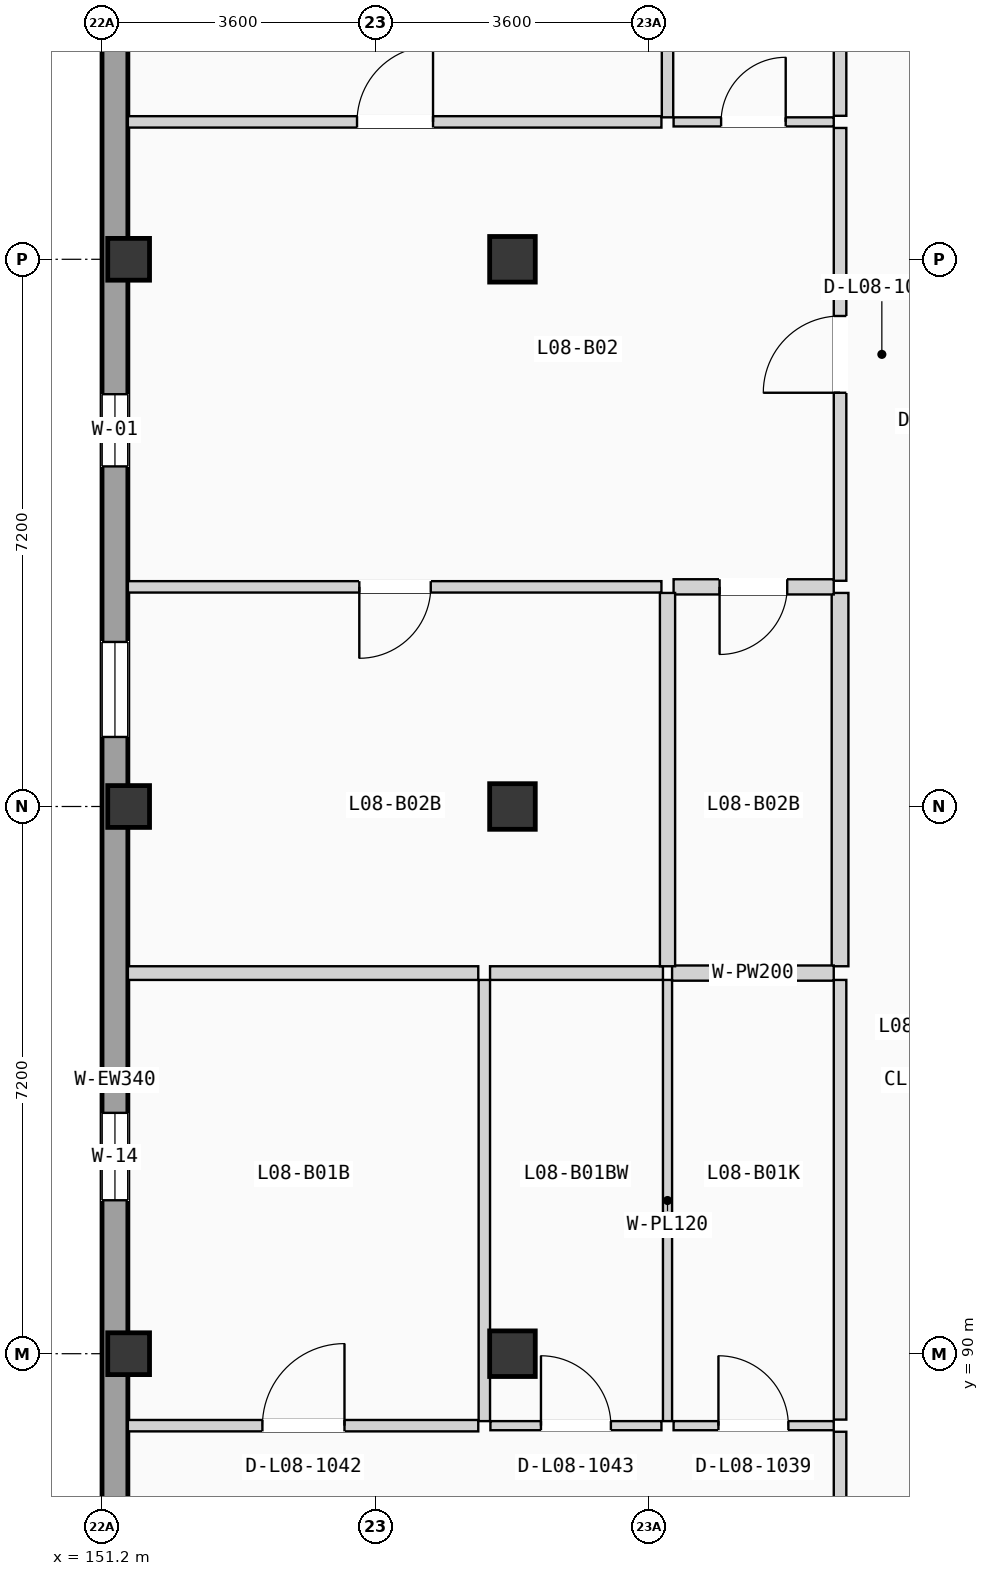
"""IFC4 building model, lengths in metres.
Left out: names, types, materials, properties, quantities, classifications, styles, units other than length and angle.
Written with IfcOpenShell. Run it as: python <this file> out.ifc"""

import sys

from ifc_helpers import new_model, si_unit, direction, frame, frame_2d, origin, origin_2d, place, context, subcontext, project, spatial, rectangle, extrude, element, fill, save


model = new_model("IFC4")
c1 = context("Model", 3, precision=1e-05, world=origin(), true_north=direction((0.0, 1.0)))
c2 = subcontext(c1, "Body", "Model", "MODEL_VIEW")
j1 = project(units=[si_unit("LENGTHUNIT", "METRE"), si_unit("PLANEANGLEUNIT", "RADIAN")], contexts=[c1])
p1 = place(None, origin())
s1 = spatial("IfcSite", under=j1, at=p1, CompositionType="ELEMENT")
p2 = place(p1, origin())
s2 = spatial("IfcBuilding", under=s1, at=p2, CompositionType="ELEMENT")
p3 = place(p2, frame((0.0, 0.0, 27.825)))
s3 = spatial("IfcBuildingStorey", under=s2, at=p3, CompositionType="ELEMENT", Elevation=27.825)
for number, where, z_axis, x_axis in (
    (1, (151.55, 90.0, 0.0), (0.0, 0.0, 1.0), (1.0, 0.0, 0.0)),
    (2, (151.55, 97.2, 0.0), (0.0, 0.0, 1.0), (1.0, 0.0, 0.0)),
    (3, (151.55, 104.4, 0.0), (0.0, 0.0, 1.0), (1.0, 0.0, 0.0)),
):
    element("IfcColumn", number, at=place(p3, frame(where, z_axis=z_axis, x_axis=x_axis)), inside=s3, PredefinedType="COLUMN", context=c2, shape_type="SweptSolid", body=[
        extrude(rectangle(XDim=0.55, YDim=0.55, at=origin_2d()), origin(), (0.0, 0.0, 1.0), 3.15),
    ])
for number, where, z_axis, x_axis in (
    (4, (156.6, 90.0, 0.0), (0.0, 0.0, 1.0), (1.0, 0.0, 0.0)),
    (5, (156.6, 97.2, 0.0), (0.0, 0.0, 1.0), (1.0, 0.0, 0.0)),
    (6, (156.6, 104.4, 0.0), (0.0, 0.0, 1.0), (1.0, 0.0, 0.0)),
):
    element("IfcColumn", number, at=place(p3, frame(where, z_axis=z_axis, x_axis=x_axis)), inside=s3, PredefinedType="COLUMN", context=c2, shape_type="SweptSolid", body=[
        extrude(rectangle(XDim=0.6, YDim=0.6, at=origin_2d()), origin(), (0.0, 0.0, 1.0), 3.15),
    ])
p4 = place(p3, frame((151.37, 68.74, 0.0), z_axis=(0.0, 0.0, 1.0), x_axis=(0.0, 1.0, 0.0)))
e7 = element("IfcWall", 7, at=p4, inside=s3, PredefinedType="SOLIDWALL", context=c2, shape_type="SweptSolid", body=[
    extrude(rectangle(XDim=49.72, YDim=0.34, at=frame_2d((24.86, 0.0))), origin(), (0.0, 0.0, 1.0), 2.89),
])
p5 = place(p4, frame((16.707, 0.0, 0.855)))
e8 = element("IfcOpeningElement", 8, at=p5, cuts=e7, PredefinedType="OPENING", context=c2, shape_type="SweptSolid", body=[
    extrude(rectangle(XDim=1.15, YDim=1.35, at=frame_2d((0.575, 0.675))), frame((0.0, 0.18, 0.0), z_axis=(0.0, -1.0, 0.0), x_axis=(1.0, 0.0, 0.0)), (0.0, 0.0, 1.0), 0.36),
])
p6 = place(p4, frame((9.578, 0.0, 0.705)))
e9 = element("IfcOpeningElement", 9, at=p6, cuts=e7, PredefinedType="OPENING", context=c2, shape_type="SweptSolid", body=[
    extrude(rectangle(XDim=1.15, YDim=1.5, at=frame_2d((0.575, 0.75))), frame((0.0, 0.18, 0.0), z_axis=(0.0, -1.0, 0.0), x_axis=(1.0, 0.0, 0.0)), (0.0, 0.0, 1.0), 0.36),
])
p7 = place(p4, frame((23.279, 0.0, 0.555)))
e10 = element("IfcOpeningElement", 10, at=p7, cuts=e7, PredefinedType="OPENING", context=c2, shape_type="SweptSolid", body=[
    extrude(rectangle(XDim=1.15, YDim=1.65, at=frame_2d((0.575, 0.825))), frame((0.0, 0.18, 0.0), z_axis=(0.0, -1.0, 0.0), x_axis=(1.0, 0.0, 0.0)), (0.0, 0.0, 1.0), 0.36),
])
p8 = place(p4, frame((32.935, 0.0, 0.85)))
e11 = element("IfcOpeningElement", 11, at=p8, cuts=e7, PredefinedType="OPENING", context=c2, shape_type="SweptSolid", body=[
    extrude(rectangle(XDim=0.95, YDim=1.2, at=frame_2d((0.475, 0.6))), frame((0.0, 0.18, 0.0), z_axis=(0.0, -1.0, 0.0), x_axis=(1.0, 0.0, 0.0)), (0.0, 0.0, 1.0), 0.36),
])
p9 = place(p4, frame((29.375, 0.0, 0.9)))
e12 = element("IfcOpeningElement", 12, at=p9, cuts=e7, PredefinedType="OPENING", context=c2, shape_type="SweptSolid", body=[
    extrude(rectangle(XDim=1.25, YDim=1.2, at=frame_2d((0.625, 0.6))), frame((0.0, 0.18, 0.0), z_axis=(0.0, -1.0, 0.0), x_axis=(1.0, 0.0, 0.0)), (0.0, 0.0, 1.0), 0.36),
])
p10 = place(p4, frame((39.379, 0.0, 0.855)))
e13 = element("IfcOpeningElement", 13, at=p10, cuts=e7, PredefinedType="OPENING", context=c2, shape_type="SweptSolid", body=[
    extrude(rectangle(XDim=1.25, YDim=1.35, at=frame_2d((0.625, 0.675))), frame((0.0, 0.18, 0.0), z_axis=(0.0, -1.0, 0.0), x_axis=(1.0, 0.0, 0.0)), (0.0, 0.0, 1.0), 0.36),
])
p11 = place(p3, frame((160.91, 81.945, 0.0), z_axis=(0.0, 0.0, 1.0), x_axis=(0.0, 1.0, 0.0)))
e14 = element("IfcWall", 14, at=p11, inside=s3, PredefinedType="PARTITIONING", context=c2, shape_type="SweptSolid", body=[
    extrude(rectangle(XDim=7.028, YDim=0.165, at=frame_2d((3.514, 0.0))), origin(), (0.0, 0.0, 1.0), 2.87),
])
p12 = place(p11, frame((3.009, 0.0, 0.0)))
e15 = element("IfcOpeningElement", 15, at=p12, cuts=e14, PredefinedType="OPENING", context=c2, shape_type="SweptSolid", body=[
    extrude(rectangle(XDim=1.01, YDim=2.11, at=frame_2d((0.505, 1.055))), frame((0.0, 0.093, 0.0), z_axis=(0.0, -1.0, 0.0), x_axis=(1.0, 0.0, 0.0)), (0.0, 0.0, 1.0), 0.185),
])
p13 = place(p3, frame((160.91, 89.133, 0.0), z_axis=(0.0, 0.0, 1.0), x_axis=(0.0, 1.0, 0.0)))
e16 = element("IfcWall", 16, at=p13, inside=s3, PredefinedType="PARTITIONING", context=c2, shape_type="SweptSolid", body=[
    extrude(rectangle(XDim=5.785, YDim=0.165, at=frame_2d((2.893, 0.0))), origin(), (0.0, 0.0, 1.0), 2.87),
])
p14 = place(p3, frame((160.91, 100.17, 0.0), z_axis=(0.0, 0.0, 1.0), x_axis=(0.0, 1.0, 0.0)))
e17 = element("IfcWall", 17, at=p14, inside=s3, PredefinedType="PARTITIONING", context=c2, shape_type="SweptSolid", body=[
    extrude(rectangle(XDim=5.958, YDim=0.165, at=frame_2d((2.979, 0.0))), origin(), (0.0, 0.0, 1.0), 2.87),
])
p15 = place(p14, frame((2.474, 0.0, 0.0)))
e18 = element("IfcOpeningElement", 18, at=p15, cuts=e17, PredefinedType="OPENING", context=c2, shape_type="SweptSolid", body=[
    extrude(rectangle(XDim=1.01, YDim=2.11, at=frame_2d((0.505, 1.055))), frame((0.0, 0.093, 0.0), z_axis=(0.0, -1.0, 0.0), x_axis=(1.0, 0.0, 0.0)), (0.0, 0.0, 1.0), 0.185),
])
p16 = place(p3, frame((160.91, 95.098, 0.0), z_axis=(0.0, 0.0, 1.0), x_axis=(0.0, 1.0, 0.0)))
e19 = element("IfcWall", 19, at=p16, inside=s3, PredefinedType="PLUMBINGWALL", context=c2, shape_type="SweptSolid", body=[
    extrude(rectangle(XDim=4.912, YDim=0.22, at=frame_2d((2.456, 0.0))), origin(), (0.0, 0.0, 1.0), 2.87),
])
p17 = place(p3, frame((160.91, 106.288, 0.0), z_axis=(0.0, 0.0, 1.0), x_axis=(0.0, 1.0, 0.0)))
e20 = element("IfcWall", 20, at=p17, inside=s3, PredefinedType="PARTITIONING", context=c2, shape_type="SweptSolid", body=[
    extrude(rectangle(XDim=4.912, YDim=0.165, at=frame_2d((2.456, 0.0))), origin(), (0.0, 0.0, 1.0), 2.87),
])
p18 = place(p3, frame((158.72, 89.053, 0.0), z_axis=(0.0, 0.0, 1.0), x_axis=(1.0, 0.0, 0.0)))
e21 = element("IfcWall", 21, at=p18, inside=s3, PredefinedType="PARTITIONING", context=c2, shape_type="SweptSolid", body=[
    extrude(rectangle(XDim=2.107, YDim=0.12, at=frame_2d((1.053, 0.0))), origin(), (0.0, 0.0, 1.0), 2.87),
])
p19 = place(p18, frame((0.59, 0.0, 0.0)))
e22 = element("IfcOpeningElement", 22, at=p19, cuts=e21, PredefinedType="OPENING", context=c2, shape_type="SweptSolid", body=[
    extrude(rectangle(XDim=0.92, YDim=2.02, at=frame_2d((0.46, 1.01))), frame((0.0, 0.07, 0.0), z_axis=(0.0, -1.0, 0.0), x_axis=(1.0, 0.0, 0.0)), (0.0, 0.0, 1.0), 0.14),
])
p20 = place(p3, frame((151.54, 89.053, 0.0), z_axis=(0.0, 0.0, 1.0), x_axis=(1.0, 0.0, 0.0)))
e23 = element("IfcWall", 23, at=p20, inside=s3, PredefinedType="PARTITIONING", context=c2, shape_type="SweptSolid", body=[
    extrude(rectangle(XDim=4.61, YDim=0.15, at=frame_2d((2.305, 0.0))), origin(), (0.0, 0.0, 1.0), 2.87),
])
p21 = place(p20, frame((1.77, 0.0, 0.0)))
e24 = element("IfcOpeningElement", 24, at=p21, cuts=e23, PredefinedType="OPENING", context=c2, shape_type="SweptSolid", body=[
    extrude(rectangle(XDim=1.08, YDim=2.1, at=frame_2d((0.54, 1.05))), frame((0.0, 0.085, 0.0), z_axis=(0.0, -1.0, 0.0), x_axis=(1.0, 0.0, 0.0)), (0.0, 0.0, 1.0), 0.17),
])
p22 = place(p3, frame((156.31, 89.053, 0.0), z_axis=(0.0, 0.0, 1.0), x_axis=(1.0, 0.0, 0.0)))
e25 = element("IfcWall", 25, at=p22, inside=s3, PredefinedType="PARTITIONING", context=c2, shape_type="SweptSolid", body=[
    extrude(rectangle(XDim=2.25, YDim=0.12, at=frame_2d((1.125, 0.0))), origin(), (0.0, 0.0, 1.0), 2.87),
])
p23 = place(p22, frame((0.665, 0.0, 0.0)))
e26 = element("IfcOpeningElement", 26, at=p23, cuts=e25, PredefinedType="OPENING", context=c2, shape_type="SweptSolid", body=[
    extrude(rectangle(XDim=0.92, YDim=2.02, at=frame_2d((0.46, 1.01))), frame((0.0, 0.07, 0.0), z_axis=(0.0, -1.0, 0.0), x_axis=(1.0, 0.0, 0.0)), (0.0, 0.0, 1.0), 0.14),
])
p24 = place(p3, frame((158.64, 89.113, 0.0), z_axis=(0.0, 0.0, 1.0), x_axis=(0.0, 1.0, 0.0)))
e27 = element("IfcWall", 27, at=p24, inside=s3, PredefinedType="PARTITIONING", context=c2, shape_type="SweptSolid", body=[
    extrude(rectangle(XDim=5.805, YDim=0.12, at=frame_2d((2.902, 0.0))), origin(), (0.0, 0.0, 1.0), 2.87),
])
p25 = place(p3, frame((158.7, 95.008, 0.0), z_axis=(0.0, 0.0, 1.0), x_axis=(1.0, 0.0, 0.0)))
e28 = element("IfcWall", 28, at=p25, inside=s3, PredefinedType="PLUMBINGWALL", context=c2, shape_type="SweptSolid", body=[
    extrude(rectangle(XDim=2.127, YDim=0.2, at=frame_2d((1.063, 0.0))), origin(), (0.0, 0.0, 1.0), 2.87),
])
p26 = place(p3, frame((156.23, 89.113, 0.0), z_axis=(0.0, 0.0, 1.0), x_axis=(0.0, 1.0, 0.0)))
e29 = element("IfcWall", 29, at=p26, inside=s3, PredefinedType="PARTITIONING", context=c2, shape_type="SweptSolid", body=[
    extrude(rectangle(XDim=5.805, YDim=0.15, at=frame_2d((2.902, 0.0))), origin(), (0.0, 0.0, 1.0), 2.87),
])
p27 = place(p3, frame((151.54, 95.008, 0.0), z_axis=(0.0, 0.0, 1.0), x_axis=(1.0, 0.0, 0.0)))
e30 = element("IfcWall", 30, at=p27, inside=s3, PredefinedType="PARTITIONING", context=c2, shape_type="SweptSolid", body=[
    extrude(rectangle(XDim=4.61, YDim=0.18, at=frame_2d((2.305, 0.0))), origin(), (0.0, 0.0, 1.0), 2.87),
])
p28 = place(p3, frame((156.305, 95.008, 0.0), z_axis=(0.0, 0.0, 1.0), x_axis=(1.0, 0.0, 0.0)))
e31 = element("IfcWall", 31, at=p28, inside=s3, PredefinedType="PARTITIONING", context=c2, shape_type="SweptSolid", body=[
    extrude(rectangle(XDim=2.275, YDim=0.18, at=frame_2d((1.138, 0.0))), origin(), (0.0, 0.0, 1.0), 2.87),
])
p29 = place(p3, frame((158.72, 100.09, 0.0), z_axis=(0.0, 0.0, 1.0), x_axis=(1.0, 0.0, 0.0)))
e32 = element("IfcWall", 32, at=p29, inside=s3, PredefinedType="PLUMBINGWALL", context=c2, shape_type="SweptSolid", body=[
    extrude(rectangle(XDim=2.107, YDim=0.2, at=frame_2d((1.053, 0.0))), origin(), (0.0, 0.0, 1.0), 2.87),
])
p30 = place(p29, frame((0.605, 0.0, 0.0)))
e33 = element("IfcOpeningElement", 33, at=p30, cuts=e32, PredefinedType="OPENING", context=c2, shape_type="SweptSolid", body=[
    extrude(rectangle(XDim=0.89, YDim=2.03, at=frame_2d((0.445, 1.015))), frame((0.0, 0.11, 0.0), z_axis=(0.0, -1.0, 0.0), x_axis=(1.0, 0.0, 0.0)), (0.0, 0.0, 1.0), 0.22),
])
p31 = place(p3, frame((158.72, 106.208, 0.0), z_axis=(0.0, 0.0, 1.0), x_axis=(1.0, 0.0, 0.0)))
e34 = element("IfcWall", 34, at=p31, inside=s3, PredefinedType="PARTITIONING", context=c2, shape_type="SweptSolid", body=[
    extrude(rectangle(XDim=2.107, YDim=0.12, at=frame_2d((1.053, 0.0))), origin(), (0.0, 0.0, 1.0), 2.87),
])
p32 = place(p31, frame((0.625, 0.0, 0.0)))
e35 = element("IfcOpeningElement", 35, at=p32, cuts=e34, PredefinedType="OPENING", context=c2, shape_type="SweptSolid", body=[
    extrude(rectangle(XDim=0.85, YDim=2.01, at=frame_2d((0.425, 1.005))), frame((0.0, 0.07, 0.0), z_axis=(0.0, -1.0, 0.0), x_axis=(1.0, 0.0, 0.0)), (0.0, 0.0, 1.0), 0.14),
])
p33 = place(p3, frame((151.54, 100.09, 0.0), z_axis=(0.0, 0.0, 1.0), x_axis=(1.0, 0.0, 0.0)))
e36 = element("IfcWall", 36, at=p33, inside=s3, PredefinedType="PARTITIONING", context=c2, shape_type="SweptSolid", body=[
    extrude(rectangle(XDim=7.02, YDim=0.15, at=frame_2d((3.51, 0.0))), origin(), (0.0, 0.0, 1.0), 2.87),
])
p34 = place(p33, frame((3.045, 0.0, 0.0)))
e37 = element("IfcOpeningElement", 37, at=p34, cuts=e36, PredefinedType="OPENING", context=c2, shape_type="SweptSolid", body=[
    extrude(rectangle(XDim=0.94, YDim=2.06, at=frame_2d((0.47, 1.03))), frame((0.0, 0.085, 0.0), z_axis=(0.0, -1.0, 0.0), x_axis=(1.0, 0.0, 0.0)), (0.0, 0.0, 1.0), 0.17),
])
p35 = place(p3, frame((151.54, 106.208, 0.0), z_axis=(0.0, 0.0, 1.0), x_axis=(1.0, 0.0, 0.0)))
e38 = element("IfcWall", 38, at=p35, inside=s3, PredefinedType="PARTITIONING", context=c2, shape_type="SweptSolid", body=[
    extrude(rectangle(XDim=7.02, YDim=0.15, at=frame_2d((3.51, 0.0))), origin(), (0.0, 0.0, 1.0), 2.87),
])
p36 = place(p35, frame((3.015, 0.0, 0.0)))
e39 = element("IfcOpeningElement", 39, at=p36, cuts=e38, PredefinedType="OPENING", context=c2, shape_type="SweptSolid", body=[
    extrude(rectangle(XDim=1.0, YDim=2.06, at=frame_2d((0.5, 1.03))), frame((0.0, 0.085, 0.0), z_axis=(0.0, -1.0, 0.0), x_axis=(1.0, 0.0, 0.0)), (0.0, 0.0, 1.0), 0.17),
])
p37 = place(p3, frame((158.64, 95.098, 0.0), z_axis=(0.0, 0.0, 1.0), x_axis=(0.0, 1.0, 0.0)))
e40 = element("IfcWall", 40, at=p37, inside=s3, PredefinedType="PLUMBINGWALL", context=c2, shape_type="SweptSolid", body=[
    extrude(rectangle(XDim=4.912, YDim=0.2, at=frame_2d((2.456, 0.0))), origin(), (0.0, 0.0, 1.0), 2.87),
])
p38 = place(p3, frame((158.64, 106.268, 0.0), z_axis=(0.0, 0.0, 1.0), x_axis=(0.0, 1.0, 0.0)))
e41 = element("IfcWall", 41, at=p38, inside=s3, PredefinedType="PARTITIONING", context=c2, shape_type="SweptSolid", body=[
    extrude(rectangle(XDim=4.932, YDim=0.15, at=frame_2d((2.466, 0.0))), origin(), (0.0, 0.0, 1.0), 2.87),
])
p39 = place(p7, origin())
e42 = element("IfcWindow", 42, at=p39, inside=s3, PartitioningType="SINGLE_PANEL", PredefinedType="WINDOW", context=c2, shape_type="SweptSolid", body=[
    extrude(rectangle(XDim=1.15, YDim=1.65, at=frame_2d((0.575, 0.825))), frame((0.0, 0.03, 0.0), z_axis=(0.0, -1.0, 0.0), x_axis=(1.0, 0.0, 0.0)), (0.0, 0.0, 1.0), 0.06),
])
fill(e10, e42)
p40 = place(p8, origin())
e43 = element("IfcWindow", 43, at=p40, inside=s3, PartitioningType="SINGLE_PANEL", PredefinedType="WINDOW", context=c2, shape_type="SweptSolid", body=[
    extrude(rectangle(XDim=0.95, YDim=1.2, at=frame_2d((0.475, 0.6))), frame((0.0, 0.03, 0.0), z_axis=(0.0, -1.0, 0.0), x_axis=(1.0, 0.0, 0.0)), (0.0, 0.0, 1.0), 0.06),
])
fill(e11, e43)
p41 = place(p9, origin())
e44 = element("IfcWindow", 44, at=p41, inside=s3, PartitioningType="SINGLE_PANEL", PredefinedType="WINDOW", context=c2, shape_type="SweptSolid", body=[
    extrude(rectangle(XDim=1.25, YDim=1.2, at=frame_2d((0.625, 0.6))), frame((0.0, 0.03, 0.0), z_axis=(0.0, -1.0, 0.0), x_axis=(1.0, 0.0, 0.0)), (0.0, 0.0, 1.0), 0.06),
])
fill(e12, e44)
p42 = place(p15, origin())
e45 = element("IfcDoor", 45, at=p42, inside=s3, OperationType="SINGLE_SWING_LEFT", PredefinedType="DOOR", context=c2, shape_type="SweptSolid", body=[
    extrude(rectangle(XDim=1.01, YDim=2.11, at=frame_2d((0.505, 1.055))), frame((0.0, 0.025, 0.0), z_axis=(0.0, -1.0, 0.0), x_axis=(1.0, 0.0, 0.0)), (0.0, 0.0, 1.0), 0.05),
])
fill(e18, e45)
p43 = place(p19, origin())
e46 = element("IfcDoor", 46, at=p43, inside=s3, OperationType="SINGLE_SWING_LEFT", PredefinedType="DOOR", context=c2, shape_type="SweptSolid", body=[
    extrude(rectangle(XDim=0.92, YDim=2.02, at=frame_2d((0.46, 1.01))), frame((0.0, 0.025, 0.0), z_axis=(0.0, -1.0, 0.0), x_axis=(1.0, 0.0, 0.0)), (0.0, 0.0, 1.0), 0.05),
])
fill(e22, e46)
p44 = place(p21, origin())
e47 = element("IfcDoor", 47, at=p44, inside=s3, OperationType="SINGLE_SWING_RIGHT", PredefinedType="DOOR", context=c2, shape_type="SweptSolid", body=[
    extrude(rectangle(XDim=1.08, YDim=2.1, at=frame_2d((0.54, 1.05))), frame((0.0, 0.025, 0.0), z_axis=(0.0, -1.0, 0.0), x_axis=(1.0, 0.0, 0.0)), (0.0, 0.0, 1.0), 0.05),
])
fill(e24, e47)
p45 = place(p23, origin())
e48 = element("IfcDoor", 48, at=p45, inside=s3, OperationType="SINGLE_SWING_LEFT", PredefinedType="DOOR", context=c2, shape_type="SweptSolid", body=[
    extrude(rectangle(XDim=0.92, YDim=2.02, at=frame_2d((0.46, 1.01))), frame((0.0, 0.025, 0.0), z_axis=(0.0, -1.0, 0.0), x_axis=(1.0, 0.0, 0.0)), (0.0, 0.0, 1.0), 0.05),
])
fill(e26, e48)
p46 = place(p30, frame((0.89, 0.0, 0.0), z_axis=(0.0, 0.0, 1.0), x_axis=(-1.0, 0.0, 0.0)))
e49 = element("IfcDoor", 49, at=p46, inside=s3, OperationType="SINGLE_SWING_LEFT", PredefinedType="DOOR", context=c2, shape_type="SweptSolid", body=[
    extrude(rectangle(XDim=0.89, YDim=2.03, at=frame_2d((0.445, 1.015))), frame((0.0, 0.025, 0.0), z_axis=(0.0, -1.0, 0.0), x_axis=(1.0, 0.0, 0.0)), (0.0, 0.0, 1.0), 0.05),
])
fill(e33, e49)
p47 = place(p32, origin())
e50 = element("IfcDoor", 50, at=p47, inside=s3, OperationType="SINGLE_SWING_RIGHT", PredefinedType="DOOR", context=c2, shape_type="SweptSolid", body=[
    extrude(rectangle(XDim=0.85, YDim=2.01, at=frame_2d((0.425, 1.005))), frame((0.0, 0.025, 0.0), z_axis=(0.0, -1.0, 0.0), x_axis=(1.0, 0.0, 0.0)), (0.0, 0.0, 1.0), 0.05),
])
fill(e35, e50)
p48 = place(p34, frame((0.94, 0.0, 0.0), z_axis=(0.0, 0.0, 1.0), x_axis=(-1.0, 0.0, 0.0)))
e51 = element("IfcDoor", 51, at=p48, inside=s3, OperationType="SINGLE_SWING_LEFT", PredefinedType="DOOR", context=c2, shape_type="SweptSolid", body=[
    extrude(rectangle(XDim=0.94, YDim=2.06, at=frame_2d((0.47, 1.03))), frame((0.0, 0.025, 0.0), z_axis=(0.0, -1.0, 0.0), x_axis=(1.0, 0.0, 0.0)), (0.0, 0.0, 1.0), 0.05),
])
fill(e37, e51)
p49 = place(p36, origin())
e52 = element("IfcDoor", 52, at=p49, inside=s3, OperationType="SINGLE_SWING_RIGHT", PredefinedType="DOOR", context=c2, shape_type="SweptSolid", body=[
    extrude(rectangle(XDim=1.0, YDim=2.06, at=frame_2d((0.5, 1.03))), frame((0.0, 0.025, 0.0), z_axis=(0.0, -1.0, 0.0), x_axis=(1.0, 0.0, 0.0)), (0.0, 0.0, 1.0), 0.05),
])
fill(e39, e52)
save(model, sys.argv[1])
